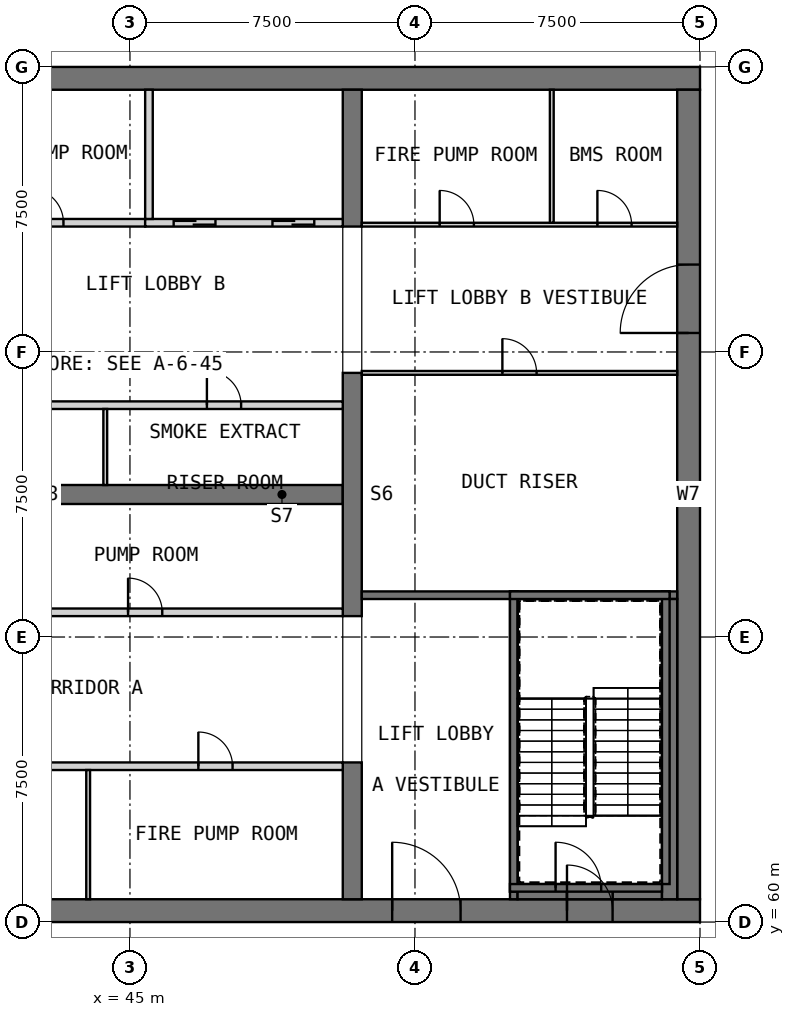
"""IFC4 building model, lengths in metres.
Left out: names, types, materials, properties, quantities, classifications, styles, units other than length and angle.
Written with IfcOpenShell. Run it as: python <this file> out.ifc"""

import sys

from ifc_helpers import new_model, si_unit, direction, frame, frame_2d, origin, place, context, subcontext, project, spatial, rectangle, extrude, element, fill, save


model = new_model("IFC4")
c1 = context("Model", 3, precision=1e-05, world=origin(), true_north=direction((0.0, 1.0)))
c2 = subcontext(c1, "Body", "Model", "MODEL_VIEW")
j1 = project(units=[si_unit("LENGTHUNIT", "METRE"), si_unit("PLANEANGLEUNIT", "RADIAN")], contexts=[c1])
p1 = place(None, origin())
s1 = spatial("IfcSite", under=j1, at=p1, CompositionType="ELEMENT")
p2 = place(p1, origin())
s2 = spatial("IfcBuilding", under=s1, at=p2, CompositionType="ELEMENT")
p3 = place(p2, frame((0.0, 0.0, 320.2)))
s3 = spatial("IfcBuildingStorey", under=s2, at=p3, CompositionType="ELEMENT", Elevation=320.2)
p4 = place(p3, frame((30.0, 60.3, 0.0), z_axis=(0.0, 0.0, 1.0), x_axis=(1.0, 0.0, 0.0)))
e1 = element("IfcWall", 1, at=p4, inside=s3, PredefinedType="SHEAR", context=c2, shape_type="SweptSolid", body=[
    extrude(rectangle(XDim=30.0, YDim=0.6, at=frame_2d((15.0, 0.0))), origin(), (0.0, 0.0, 1.0), 7.7),
])
p5 = place(p4, frame((21.9, 0.0, 0.0)))
e2 = element("IfcOpeningElement", 2, at=p5, cuts=e1, PredefinedType="OPENING", context=c2, shape_type="SweptSolid", body=[
    extrude(rectangle(XDim=1.8, YDim=2.1, at=frame_2d((0.9, 1.05))), frame((0.0, 0.31, 0.0), z_axis=(0.0, -1.0, 0.0), x_axis=(1.0, 0.0, 0.0)), (0.0, 0.0, 1.0), 0.62),
])
p6 = place(p4, frame((26.5, 0.0, 0.0)))
e3 = element("IfcOpeningElement", 3, at=p6, cuts=e1, PredefinedType="OPENING", context=c2, shape_type="SweptSolid", body=[
    extrude(rectangle(XDim=1.2, YDim=2.1, at=frame_2d((0.6, 1.05))), frame((0.0, 0.31, 0.0), z_axis=(0.0, -1.0, 0.0), x_axis=(1.0, 0.0, 0.0)), (0.0, 0.0, 1.0), 0.62),
])
p7 = place(p3, frame((30.0, 82.2, 0.0), z_axis=(0.0, 0.0, 1.0), x_axis=(1.0, 0.0, 0.0)))
e4 = element("IfcWall", 4, at=p7, inside=s3, PredefinedType="SHEAR", context=c2, shape_type="SweptSolid", body=[
    extrude(rectangle(XDim=30.0, YDim=0.6, at=frame_2d((15.0, 0.0))), origin(), (0.0, 0.0, 1.0), 7.7),
])
p8 = place(p3, frame((59.7, 60.6, 0.0), z_axis=(0.0, 0.0, 1.0), x_axis=(0.0, 1.0, 0.0)))
e5 = element("IfcWall", 5, at=p8, inside=s3, PredefinedType="SHEAR", context=c2, shape_type="SweptSolid", body=[
    extrude(rectangle(XDim=21.3, YDim=0.6, at=frame_2d((10.65, 0.0))), origin(), (0.0, 0.0, 1.0), 7.7),
])
p9 = place(p8, frame((14.9, 0.0, 0.0)))
e6 = element("IfcOpeningElement", 6, at=p9, cuts=e5, PredefinedType="OPENING", context=c2, shape_type="SweptSolid", body=[
    extrude(rectangle(XDim=1.8, YDim=2.1, at=frame_2d((0.9, 1.05))), frame((0.0, 0.31, 0.0), z_axis=(0.0, -1.0, 0.0), x_axis=(1.0, 0.0, 0.0)), (0.0, 0.0, 1.0), 0.62),
])
p10 = place(p3, frame((35.0, 71.25, 0.0), z_axis=(0.0, 0.0, 1.0), x_axis=(1.0, 0.0, 0.0)))
e7 = element("IfcWall", 7, at=p10, inside=s3, PredefinedType="SHEAR", context=c2, shape_type="SweptSolid", body=[
    extrude(rectangle(XDim=15.6, YDim=0.5, at=frame_2d((7.8, 0.0))), origin(), (0.0, 0.0, 1.0), 7.7),
])
p11 = place(p3, frame((50.85, 60.6, 0.0), z_axis=(0.0, 0.0, 1.0), x_axis=(0.0, 1.0, 0.0)))
e8 = element("IfcWall", 8, at=p11, inside=s3, PredefinedType="SHEAR", context=c2, shape_type="SweptSolid", body=[
    extrude(rectangle(XDim=3.6, YDim=0.5, at=frame_2d((1.8, 0.0))), origin(), (0.0, 0.0, 1.0), 7.7),
])
p12 = place(p3, frame((50.85, 68.05, 0.0), z_axis=(0.0, 0.0, 1.0), x_axis=(0.0, 1.0, 0.0)))
e9 = element("IfcWall", 9, at=p12, inside=s3, PredefinedType="SHEAR", context=c2, shape_type="SweptSolid", body=[
    extrude(rectangle(XDim=6.4, YDim=0.5, at=frame_2d((3.2, 0.0))), origin(), (0.0, 0.0, 1.0), 7.7),
])
p13 = place(p3, frame((50.85, 78.3, 0.0), z_axis=(0.0, 0.0, 1.0), x_axis=(0.0, 1.0, 0.0)))
e10 = element("IfcWall", 10, at=p13, inside=s3, PredefinedType="SHEAR", context=c2, shape_type="SweptSolid", body=[
    extrude(rectangle(XDim=3.6, YDim=0.5, at=frame_2d((1.8, 0.0))), origin(), (0.0, 0.0, 1.0), 7.7),
])
p14 = place(p3, frame((35.0, 64.1, 0.0), z_axis=(0.0, 0.0, 1.0), x_axis=(1.0, 0.0, 0.0)))
e11 = element("IfcWall", 11, at=p14, inside=s3, PredefinedType="PARTITIONING", context=c2, shape_type="SweptSolid", body=[
    extrude(rectangle(XDim=15.6, YDim=0.2, at=frame_2d((7.8, 0.0))), origin(), (0.0, 0.0, 1.0), 7.7),
])
p15 = place(p14, frame((4.0, 0.0, 0.0)))
e12 = element("IfcOpeningElement", 12, at=p15, cuts=e11, PredefinedType="OPENING", context=c2, shape_type="SweptSolid", body=[
    extrude(rectangle(XDim=0.9, YDim=2.1, at=frame_2d((0.45, 1.05))), frame((0.0, 0.11, 0.0), z_axis=(0.0, -1.0, 0.0), x_axis=(1.0, 0.0, 0.0)), (0.0, 0.0, 1.0), 0.22),
])
p16 = place(p14, frame((11.8, 0.0, 0.0)))
e13 = element("IfcOpeningElement", 13, at=p16, cuts=e11, PredefinedType="OPENING", context=c2, shape_type="SweptSolid", body=[
    extrude(rectangle(XDim=0.9, YDim=2.1, at=frame_2d((0.45, 1.05))), frame((0.0, 0.11, 0.0), z_axis=(0.0, -1.0, 0.0), x_axis=(1.0, 0.0, 0.0)), (0.0, 0.0, 1.0), 0.22),
])
p17 = place(p3, frame((43.9, 60.6, 0.0), z_axis=(0.0, 0.0, 1.0), x_axis=(0.0, 1.0, 0.0)))
e14 = element("IfcWall", 14, at=p17, inside=s3, PredefinedType="PARTITIONING", context=c2, shape_type="SweptSolid", body=[
    extrude(rectangle(XDim=3.4, YDim=0.1, at=frame_2d((1.7, 0.0))), origin(), (0.0, 0.0, 1.0), 7.7),
])
p18 = place(p3, frame((35.0, 68.15, 0.0), z_axis=(0.0, 0.0, 1.0), x_axis=(1.0, 0.0, 0.0)))
e15 = element("IfcWall", 15, at=p18, inside=s3, PredefinedType="PARTITIONING", context=c2, shape_type="SweptSolid", body=[
    extrude(rectangle(XDim=15.6, YDim=0.2, at=frame_2d((7.8, 0.0))), origin(), (0.0, 0.0, 1.0), 7.7),
])
p19 = place(p18, frame((2.15, 0.0, 0.0)))
e16 = element("IfcOpeningElement", 16, at=p19, cuts=e15, PredefinedType="OPENING", context=c2, shape_type="SweptSolid", body=[
    extrude(rectangle(XDim=0.9, YDim=2.1, at=frame_2d((0.45, 1.05))), frame((0.0, 0.11, 0.0), z_axis=(0.0, -1.0, 0.0), x_axis=(1.0, 0.0, 0.0)), (0.0, 0.0, 1.0), 0.22),
])
p20 = place(p18, frame((9.95, 0.0, 0.0)))
e17 = element("IfcOpeningElement", 17, at=p20, cuts=e15, PredefinedType="OPENING", context=c2, shape_type="SweptSolid", body=[
    extrude(rectangle(XDim=0.9, YDim=2.1, at=frame_2d((0.45, 1.05))), frame((0.0, 0.11, 0.0), z_axis=(0.0, -1.0, 0.0), x_axis=(1.0, 0.0, 0.0)), (0.0, 0.0, 1.0), 0.22),
])
p21 = place(p3, frame((35.0, 73.6, 0.0), z_axis=(0.0, 0.0, 1.0), x_axis=(1.0, 0.0, 0.0)))
e18 = element("IfcWall", 18, at=p21, inside=s3, PredefinedType="PARTITIONING", context=c2, shape_type="SweptSolid", body=[
    extrude(rectangle(XDim=15.6, YDim=0.2, at=frame_2d((7.8, 0.0))), origin(), (0.0, 0.0, 1.0), 7.7),
])
p22 = place(p21, frame((4.225, 0.0, 0.0)))
e19 = element("IfcOpeningElement", 19, at=p22, cuts=e18, PredefinedType="OPENING", context=c2, shape_type="SweptSolid", body=[
    extrude(rectangle(XDim=0.9, YDim=2.1, at=frame_2d((0.45, 1.05))), frame((0.0, 0.11, 0.0), z_axis=(0.0, -1.0, 0.0), x_axis=(1.0, 0.0, 0.0)), (0.0, 0.0, 1.0), 0.22),
])
p23 = place(p21, frame((12.025, 0.0, 0.0)))
e20 = element("IfcOpeningElement", 20, at=p23, cuts=e18, PredefinedType="OPENING", context=c2, shape_type="SweptSolid", body=[
    extrude(rectangle(XDim=0.9, YDim=2.1, at=frame_2d((0.45, 1.05))), frame((0.0, 0.11, 0.0), z_axis=(0.0, -1.0, 0.0), x_axis=(1.0, 0.0, 0.0)), (0.0, 0.0, 1.0), 0.22),
])
p24 = place(p3, frame((44.35, 71.5, 0.0), z_axis=(0.0, 0.0, 1.0), x_axis=(0.0, 1.0, 0.0)))
e21 = element("IfcWall", 21, at=p24, inside=s3, PredefinedType="PARTITIONING", context=c2, shape_type="SweptSolid", body=[
    extrude(rectangle(XDim=2.0, YDim=0.1, at=frame_2d((1.0, 0.0))), origin(), (0.0, 0.0, 1.0), 7.7),
])
p25 = place(p3, frame((40.2, 78.4, 0.0), z_axis=(0.0, 0.0, 1.0), x_axis=(1.0, 0.0, 0.0)))
e22 = element("IfcWall", 22, at=p25, inside=s3, PredefinedType="PARTITIONING", context=c2, shape_type="SweptSolid", body=[
    extrude(rectangle(XDim=5.2, YDim=0.2, at=frame_2d((2.6, 0.0))), origin(), (0.0, 0.0, 1.0), 7.7),
])
p26 = place(p25, frame((2.15, 0.0, 0.0)))
e23 = element("IfcOpeningElement", 23, at=p26, cuts=e22, PredefinedType="OPENING", context=c2, shape_type="SweptSolid", body=[
    extrude(rectangle(XDim=0.9, YDim=2.1, at=frame_2d((0.45, 1.05))), frame((0.0, 0.11, 0.0), z_axis=(0.0, -1.0, 0.0), x_axis=(1.0, 0.0, 0.0)), (0.0, 0.0, 1.0), 0.22),
])
p27 = place(p3, frame((45.4, 78.4, 0.0), z_axis=(0.0, 0.0, 1.0), x_axis=(1.0, 0.0, 0.0)))
e24 = element("IfcWall", 24, at=p27, inside=s3, PredefinedType="SOLIDWALL", context=c2, shape_type="SweptSolid", body=[
    extrude(rectangle(XDim=5.2, YDim=0.2, at=frame_2d((2.6, 0.0))), origin(), (0.0, 0.0, 1.0), 8.0),
])
p28 = place(p27, frame((0.75, 0.0, 0.0)))
e25 = element("IfcOpeningElement", 25, at=p28, cuts=e24, PredefinedType="OPENING", context=c2, shape_type="SweptSolid", body=[
    extrude(rectangle(XDim=1.1, YDim=2.1, at=frame_2d((0.55, 1.05))), frame((0.0, 0.11, 0.0), z_axis=(0.0, -1.0, 0.0), x_axis=(1.0, 0.0, 0.0)), (0.0, 0.0, 1.0), 0.22),
])
p29 = place(p27, frame((3.35, 0.0, 0.0)))
e26 = element("IfcOpeningElement", 26, at=p29, cuts=e24, PredefinedType="OPENING", context=c2, shape_type="SweptSolid", body=[
    extrude(rectangle(XDim=1.1, YDim=2.1, at=frame_2d((0.55, 1.05))), frame((0.0, 0.11, 0.0), z_axis=(0.0, -1.0, 0.0), x_axis=(1.0, 0.0, 0.0)), (0.0, 0.0, 1.0), 0.22),
])
p30 = place(p3, frame((45.5, 78.5, 0.0), z_axis=(0.0, 0.0, 1.0), x_axis=(0.0, 1.0, 0.0)))
e27 = element("IfcWall", 27, at=p30, inside=s3, PredefinedType="SOLIDWALL", context=c2, shape_type="SweptSolid", body=[
    extrude(rectangle(XDim=3.4, YDim=0.2, at=frame_2d((1.7, 0.0))), origin(), (0.0, 0.0, 1.0), 8.0),
])
p31 = place(p3, frame((55.1, 60.6, 0.0), z_axis=(0.0, 0.0, 1.0), x_axis=(0.0, 1.0, 0.0)))
e28 = element("IfcWall", 28, at=p31, inside=s3, PredefinedType="SOLIDWALL", context=c2, shape_type="SweptSolid", body=[
    extrude(rectangle(XDim=8.0, YDim=0.2, at=frame_2d((4.0, 0.0))), origin(), (0.0, 0.0, 1.0), 7.7),
])
p32 = place(p3, frame((51.1, 68.6, 0.0), z_axis=(0.0, 0.0, 1.0), x_axis=(1.0, 0.0, 0.0)))
e29 = element("IfcWall", 29, at=p32, inside=s3, PredefinedType="SOLIDWALL", context=c2, shape_type="SweptSolid", body=[
    extrude(rectangle(XDim=8.3, YDim=0.2, at=frame_2d((4.15, 0.0))), origin(), (0.0, 0.0, 1.0), 7.7),
])
for number, where, z_axis, x_axis in (
    (30, (55.2, 60.8, 0.0), (0.0, 0.0, 1.0), (1.0, 0.0, 0.0)),
    (31, (57.7, 60.8, 0.0), (0.0, 0.0, 1.0), (1.0, 0.0, 0.0)),
):
    element("IfcWall", number, at=place(p3, frame(where, z_axis=z_axis, x_axis=x_axis)), inside=s3, PredefinedType="SOLIDWALL", context=c2, shape_type="SweptSolid", body=[
        extrude(rectangle(XDim=1.3, YDim=0.4, at=frame_2d((0.65, 0.0))), origin(), (0.0, 0.0, 1.0), 7.7),
    ])
p33 = place(p3, frame((59.2, 60.6, 0.0), z_axis=(0.0, 0.0, 1.0), x_axis=(0.0, 1.0, 0.0)))
e32 = element("IfcWall", 32, at=p33, inside=s3, PredefinedType="SOLIDWALL", context=c2, shape_type="SweptSolid", body=[
    extrude(rectangle(XDim=7.9, YDim=0.4, at=frame_2d((3.95, 0.0))), origin(), (0.0, 0.0, 1.0), 7.7),
])
p34 = place(p3, frame((56.5, 60.8, 3.2), z_axis=(0.0, 0.0, 1.0), x_axis=(1.0, 0.0, 0.0)))
e33 = element("IfcWall", 33, at=p34, inside=s3, PredefinedType="SOLIDWALL", context=c2, shape_type="SweptSolid", body=[
    extrude(rectangle(XDim=1.2, YDim=0.4, at=frame_2d((0.6, 0.0))), origin(), (0.0, 0.0, 1.0), 4.5),
])
p35 = place(p3, frame((51.1, 74.45, 0.0), z_axis=(0.0, 0.0, 1.0), x_axis=(1.0, 0.0, 0.0)))
e34 = element("IfcWall", 34, at=p35, inside=s3, PredefinedType="PARTITIONING", context=c2, shape_type="SweptSolid", body=[
    extrude(rectangle(XDim=8.3, YDim=0.1, at=frame_2d((4.15, 0.0))), origin(), (0.0, 0.0, 1.0), 7.7),
])
p36 = place(p35, frame((3.7, 0.0, 0.0)))
e35 = element("IfcOpeningElement", 35, at=p36, cuts=e34, PredefinedType="OPENING", context=c2, shape_type="SweptSolid", body=[
    extrude(rectangle(XDim=0.9, YDim=2.1, at=frame_2d((0.45, 1.05))), frame((0.0, 0.06, 0.0), z_axis=(0.0, -1.0, 0.0), x_axis=(1.0, 0.0, 0.0)), (0.0, 0.0, 1.0), 0.12),
])
p37 = place(p3, frame((51.1, 78.35, 0.0), z_axis=(0.0, 0.0, 1.0), x_axis=(1.0, 0.0, 0.0)))
e36 = element("IfcWall", 36, at=p37, inside=s3, PredefinedType="PARTITIONING", context=c2, shape_type="SweptSolid", body=[
    extrude(rectangle(XDim=8.3, YDim=0.1, at=frame_2d((4.15, 0.0))), origin(), (0.0, 0.0, 1.0), 7.7),
])
p38 = place(p37, frame((2.05, 0.0, 0.0)))
e37 = element("IfcOpeningElement", 37, at=p38, cuts=e36, PredefinedType="OPENING", context=c2, shape_type="SweptSolid", body=[
    extrude(rectangle(XDim=0.9, YDim=2.1, at=frame_2d((0.45, 1.05))), frame((0.0, 0.06, 0.0), z_axis=(0.0, -1.0, 0.0), x_axis=(1.0, 0.0, 0.0)), (0.0, 0.0, 1.0), 0.12),
])
p39 = place(p37, frame((6.2, 0.0, 0.0)))
e38 = element("IfcOpeningElement", 38, at=p39, cuts=e36, PredefinedType="OPENING", context=c2, shape_type="SweptSolid", body=[
    extrude(rectangle(XDim=0.9, YDim=2.1, at=frame_2d((0.45, 1.05))), frame((0.0, 0.06, 0.0), z_axis=(0.0, -1.0, 0.0), x_axis=(1.0, 0.0, 0.0)), (0.0, 0.0, 1.0), 0.12),
])
p40 = place(p3, frame((56.1, 78.4, 0.0), z_axis=(0.0, 0.0, 1.0), x_axis=(0.0, 1.0, 0.0)))
e39 = element("IfcWall", 39, at=p40, inside=s3, PredefinedType="PARTITIONING", context=c2, shape_type="SweptSolid", body=[
    extrude(rectangle(XDim=3.5, YDim=0.1, at=frame_2d((1.75, 0.0))), origin(), (0.0, 0.0, 1.0), 7.7),
])
p41 = place(p3, frame((55.1, 60.8, 8.0), z_axis=(0.0, 0.0, 1.0), x_axis=(0.0, 1.0, 0.0)))
e40 = element("IfcWall", 40, at=p41, inside=s3, PredefinedType="SOLIDWALL", context=c2, shape_type="SweptSolid", body=[
    extrude(rectangle(XDim=7.9, YDim=0.2, at=frame_2d((3.95, 0.0))), origin(), (0.0, 0.0, 1.0), 2.7),
])
p42 = place(p3, frame((59.1, 61.0, 8.0), z_axis=(0.0, 0.0, 1.0), x_axis=(0.0, 1.0, 0.0)))
e41 = element("IfcWall", 41, at=p42, inside=s3, PredefinedType="SOLIDWALL", context=c2, shape_type="SweptSolid", body=[
    extrude(rectangle(XDim=7.7, YDim=0.2, at=frame_2d((3.85, 0.0))), origin(), (0.0, 0.0, 1.0), 2.7),
])
p43 = place(p3, frame((55.0, 68.6, 8.0), z_axis=(0.0, 0.0, 1.0), x_axis=(1.0, 0.0, 0.0)))
e42 = element("IfcWall", 42, at=p43, inside=s3, PredefinedType="SOLIDWALL", context=c2, shape_type="SweptSolid", body=[
    extrude(rectangle(XDim=4.2, YDim=0.2, at=frame_2d((2.1, 0.0))), origin(), (0.0, 0.0, 1.0), 2.7),
])
p44 = place(p3, frame((55.0, 60.9, 8.0), z_axis=(0.0, 0.0, 1.0), x_axis=(1.0, 0.0, 0.0)))
e43 = element("IfcWall", 43, at=p44, inside=s3, PredefinedType="SOLIDWALL", context=c2, shape_type="SweptSolid", body=[
    extrude(rectangle(XDim=4.0, YDim=0.2, at=frame_2d((2.0, 0.0))), origin(), (0.0, 0.0, 1.0), 2.7),
])
p45 = place(p44, frame((1.2, 0.0, 0.0)))
e44 = element("IfcOpeningElement", 44, at=p45, cuts=e43, PredefinedType="OPENING", context=c2, shape_type="SweptSolid", body=[
    extrude(rectangle(XDim=1.2, YDim=2.1, at=frame_2d((0.6, 1.05))), frame((0.0, 0.11, 0.0), z_axis=(0.0, -1.0, 0.0), x_axis=(1.0, 0.0, 0.0)), (0.0, 0.0, 1.0), 0.22),
])
p46 = place(p16, origin())
e45 = element("IfcDoor", 45, at=p46, inside=s3, OperationType="SINGLE_SWING_LEFT", PredefinedType="DOOR", context=c2, shape_type="SweptSolid", body=[
    extrude(rectangle(XDim=0.9, YDim=2.1, at=frame_2d((0.45, 1.05))), frame((0.0, 0.025, 0.0), z_axis=(0.0, -1.0, 0.0), x_axis=(1.0, 0.0, 0.0)), (0.0, 0.0, 1.0), 0.05),
])
fill(e13, e45)
p47 = place(p20, origin())
e46 = element("IfcDoor", 46, at=p47, inside=s3, OperationType="SINGLE_SWING_LEFT", PredefinedType="DOOR", context=c2, shape_type="SweptSolid", body=[
    extrude(rectangle(XDim=0.9, YDim=2.1, at=frame_2d((0.45, 1.05))), frame((0.0, 0.025, 0.0), z_axis=(0.0, -1.0, 0.0), x_axis=(1.0, 0.0, 0.0)), (0.0, 0.0, 1.0), 0.05),
])
fill(e17, e46)
p48 = place(p23, origin())
e47 = element("IfcDoor", 47, at=p48, inside=s3, OperationType="SINGLE_SWING_LEFT", PredefinedType="DOOR", context=c2, shape_type="SweptSolid", body=[
    extrude(rectangle(XDim=0.9, YDim=2.1, at=frame_2d((0.45, 1.05))), frame((0.0, 0.025, 0.0), z_axis=(0.0, -1.0, 0.0), x_axis=(1.0, 0.0, 0.0)), (0.0, 0.0, 1.0), 0.05),
])
fill(e20, e47)
p49 = place(p26, origin())
e48 = element("IfcDoor", 48, at=p49, inside=s3, OperationType="SINGLE_SWING_RIGHT", PredefinedType="DOOR", context=c2, shape_type="SweptSolid", body=[
    extrude(rectangle(XDim=0.9, YDim=2.1, at=frame_2d((0.45, 1.05))), frame((0.0, 0.025, 0.0), z_axis=(0.0, -1.0, 0.0), x_axis=(1.0, 0.0, 0.0)), (0.0, 0.0, 1.0), 0.05),
])
fill(e23, e48)
p50 = place(p28, origin())
e49 = element("IfcDoor", 49, at=p50, inside=s3, OperationType="DOUBLE_DOOR_SLIDING", PredefinedType="DOOR", context=c2, shape_type="SweptSolid", body=[
    extrude(rectangle(XDim=1.1, YDim=2.1, at=frame_2d((0.55, 1.05))), frame((0.0, 0.025, 0.0), z_axis=(0.0, -1.0, 0.0), x_axis=(1.0, 0.0, 0.0)), (0.0, 0.0, 1.0), 0.05),
])
fill(e25, e49)
p51 = place(p29, origin())
e50 = element("IfcDoor", 50, at=p51, inside=s3, OperationType="DOUBLE_DOOR_SLIDING", PredefinedType="DOOR", context=c2, shape_type="SweptSolid", body=[
    extrude(rectangle(XDim=1.1, YDim=2.1, at=frame_2d((0.55, 1.05))), frame((0.0, 0.025, 0.0), z_axis=(0.0, -1.0, 0.0), x_axis=(1.0, 0.0, 0.0)), (0.0, 0.0, 1.0), 0.05),
])
fill(e26, e50)
p52 = place(p5, origin())
e51 = element("IfcDoor", 51, at=p52, inside=s3, OperationType="DOUBLE_DOOR_SINGLE_SWING", PredefinedType="DOOR", context=c2, shape_type="SweptSolid", body=[
    extrude(rectangle(XDim=1.8, YDim=2.1, at=frame_2d((0.9, 1.05))), frame((0.0, 0.025, 0.0), z_axis=(0.0, -1.0, 0.0), x_axis=(1.0, 0.0, 0.0)), (0.0, 0.0, 1.0), 0.05),
])
fill(e2, e51)
p53 = place(p9, origin())
e52 = element("IfcDoor", 52, at=p53, inside=s3, OperationType="DOUBLE_DOOR_SINGLE_SWING", PredefinedType="DOOR", context=c2, shape_type="SweptSolid", body=[
    extrude(rectangle(XDim=1.8, YDim=2.1, at=frame_2d((0.9, 1.05))), frame((0.0, 0.025, 0.0), z_axis=(0.0, -1.0, 0.0), x_axis=(1.0, 0.0, 0.0)), (0.0, 0.0, 1.0), 0.05),
])
fill(e6, e52)
p54 = place(p6, origin())
e53 = element("IfcDoor", 53, at=p54, inside=s3, OperationType="SINGLE_SWING_LEFT", PredefinedType="DOOR", context=c2, shape_type="SweptSolid", body=[
    extrude(rectangle(XDim=1.2, YDim=2.1, at=frame_2d((0.6, 1.05))), frame((0.0, 0.025, 0.0), z_axis=(0.0, -1.0, 0.0), x_axis=(1.0, 0.0, 0.0)), (0.0, 0.0, 1.0), 0.05),
])
fill(e3, e53)
p55 = place(p36, origin())
e54 = element("IfcDoor", 54, at=p55, inside=s3, OperationType="SINGLE_SWING_RIGHT", PredefinedType="DOOR", context=c2, shape_type="SweptSolid", body=[
    extrude(rectangle(XDim=0.9, YDim=2.1, at=frame_2d((0.45, 1.05))), frame((0.0, 0.025, 0.0), z_axis=(0.0, -1.0, 0.0), x_axis=(1.0, 0.0, 0.0)), (0.0, 0.0, 1.0), 0.05),
])
fill(e35, e54)
p56 = place(p38, origin())
e55 = element("IfcDoor", 55, at=p56, inside=s3, OperationType="SINGLE_SWING_RIGHT", PredefinedType="DOOR", context=c2, shape_type="SweptSolid", body=[
    extrude(rectangle(XDim=0.9, YDim=2.1, at=frame_2d((0.45, 1.05))), frame((0.0, 0.025, 0.0), z_axis=(0.0, -1.0, 0.0), x_axis=(1.0, 0.0, 0.0)), (0.0, 0.0, 1.0), 0.05),
])
fill(e37, e55)
p57 = place(p39, origin())
e56 = element("IfcDoor", 56, at=p57, inside=s3, OperationType="SINGLE_SWING_LEFT", PredefinedType="DOOR", context=c2, shape_type="SweptSolid", body=[
    extrude(rectangle(XDim=0.9, YDim=2.1, at=frame_2d((0.45, 1.05))), frame((0.0, 0.025, 0.0), z_axis=(0.0, -1.0, 0.0), x_axis=(1.0, 0.0, 0.0)), (0.0, 0.0, 1.0), 0.05),
])
fill(e38, e56)
p58 = place(p45, origin())
e57 = element("IfcDoor", 57, at=p58, inside=s3, OperationType="SINGLE_SWING_LEFT", PredefinedType="DOOR", context=c2, shape_type="SweptSolid", body=[
    extrude(rectangle(XDim=1.2, YDim=2.1, at=frame_2d((0.6, 1.05))), frame((0.0, 0.025, 0.0), z_axis=(0.0, -1.0, 0.0), x_axis=(1.0, 0.0, 0.0)), (0.0, 0.0, 1.0), 0.05),
])
fill(e44, e57)
save(model, sys.argv[1])
